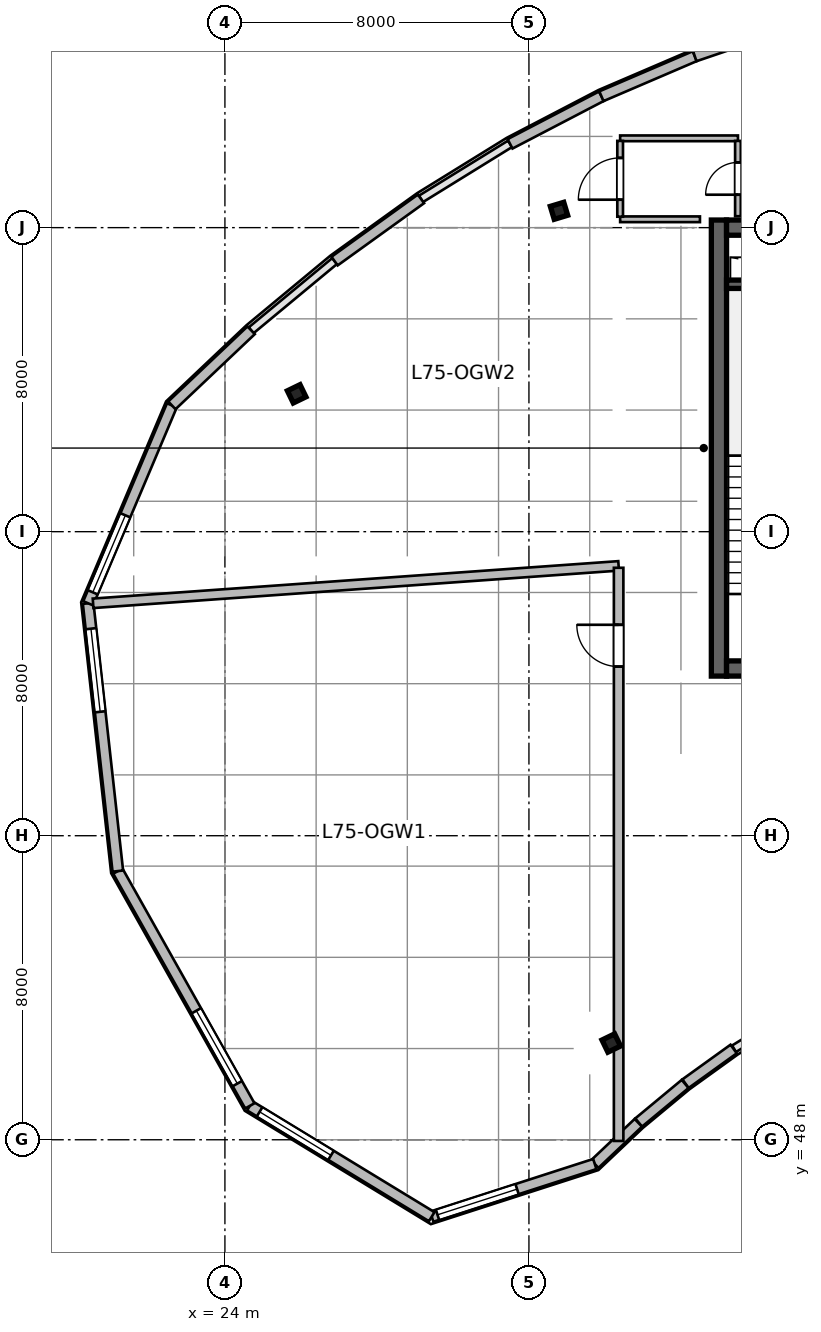
"""IFC4 building model, lengths in metres.
Left out: names, types, materials, properties, quantities, classifications, styles, units other than length and angle.
Written with IfcOpenShell. Run it as: python <this file> out.ifc"""

import sys

from ifc_helpers import new_model, si_unit, direction, frame, frame_2d, origin, origin_2d, place, context, subcontext, project, spatial, rectangle, i_section, extrude, source, transform, mapped, element, fill, save


model = new_model("IFC4")
c1 = context("Model", 3, precision=1e-05, world=origin(), true_north=direction((0.0, 1.0)))
c2 = subcontext(c1, "Body", "Model", "MODEL_VIEW")
j1 = project(units=[si_unit("LENGTHUNIT", "METRE"), si_unit("PLANEANGLEUNIT", "RADIAN")], contexts=[c1])
p1 = place(None, origin())
s1 = spatial("IfcSite", under=j1, at=p1, CompositionType="ELEMENT")
p2 = place(p1, origin())
s2 = spatial("IfcBuilding", under=s1, at=p2, CompositionType="ELEMENT")
p3 = place(p2, frame((0.0, 0.0, 307.8)))
s3 = spatial("IfcBuildingStorey", under=s2, at=p3, CompositionType="ELEMENT", Elevation=307.8)
m1 = source(origin(), c2, "Body", "SweptSolid", [
    extrude(rectangle(XDim=12.0, YDim=0.4, at=frame_2d((6.0, 0.0))), origin(), (0.0, 0.0, 1.0), 4.8),
])
p4 = place(p3, frame((37.0, 60.2, 0.0), z_axis=(0.0, 0.0, 1.0), x_axis=(0.0, 1.0, 0.0)))
e1 = element("IfcWall", 1, at=p4, inside=s3, PredefinedType="SHEAR", context=c2, shape_type="MappedRepresentation", body=[
    mapped(m1, transform((0.0, 0.0, 0.0), scale=1.0)),
])
m2 = source(origin(), c2, "Body", "SweptSolid", [
    extrude(rectangle(XDim=21.6, YDim=0.4, at=frame_2d((10.8, 0.0))), origin(), (0.0, 0.0, 1.0), 4.8),
])
p5 = place(p3, frame((37.2, 60.4, 0.0), z_axis=(0.0, 0.0, 1.0), x_axis=(1.0, 0.0, 0.0)))
e2 = element("IfcWall", 2, at=p5, inside=s3, PredefinedType="SHEAR", context=c2, shape_type="MappedRepresentation", body=[
    mapped(m2, transform((0.0, 0.0, 0.0), scale=1.0)),
])
p6 = place(p5, frame((1.1, 0.0, 0.0)))
e3 = element("IfcOpeningElement", 3, at=p6, cuts=e2, PredefinedType="OPENING", context=c2, shape_type="SweptSolid", body=[
    extrude(rectangle(XDim=1.15, YDim=2.15, at=frame_2d((0.575, 1.075))), frame((0.0, 0.21, 0.0), z_axis=(0.0, -1.0, 0.0), x_axis=(1.0, 0.0, 0.0)), (0.0, 0.0, 1.0), 0.42),
])
p7 = place(p5, frame((19.5, 0.0, 0.0)))
e4 = element("IfcOpeningElement", 4, at=p7, cuts=e2, PredefinedType="OPENING", context=c2, shape_type="SweptSolid", body=[
    extrude(rectangle(XDim=0.9, YDim=2.1, at=frame_2d((0.45, 1.05))), frame((0.0, 0.21, 0.0), z_axis=(0.0, -1.0, 0.0), x_axis=(1.0, 0.0, 0.0)), (0.0, 0.0, 1.0), 0.42),
])
p8 = place(p5, frame((12.02, 0.0, 0.0)))
e5 = element("IfcOpeningElement", 5, at=p8, cuts=e2, PredefinedType="OPENING", context=c2, shape_type="SweptSolid", body=[
    extrude(rectangle(XDim=1.6, YDim=2.15, at=frame_2d((0.8, 1.075))), frame((0.0, 0.21, 0.0), z_axis=(0.0, -1.0, 0.0), x_axis=(1.0, 0.0, 0.0)), (0.0, 0.0, 1.0), 0.42),
])
p9 = place(p3, frame((37.2, 72.0, 0.0), z_axis=(0.0, 0.0, 1.0), x_axis=(1.0, 0.0, 0.0)))
e6 = element("IfcWall", 6, at=p9, inside=s3, PredefinedType="SHEAR", context=c2, shape_type="MappedRepresentation", body=[
    mapped(m2, transform((0.0, 0.0, 0.0), scale=1.0)),
])
p10 = place(p9, frame((1.2, 0.0, 0.0)))
e7 = element("IfcOpeningElement", 7, at=p10, cuts=e6, PredefinedType="OPENING", context=c2, shape_type="SweptSolid", body=[
    extrude(rectangle(XDim=0.9, YDim=2.1, at=frame_2d((0.45, 1.05))), frame((0.0, 0.21, 0.0), z_axis=(0.0, -1.0, 0.0), x_axis=(1.0, 0.0, 0.0)), (0.0, 0.0, 1.0), 0.42),
])
p11 = place(p9, frame((14.7, 0.0, 0.0)))
e8 = element("IfcOpeningElement", 8, at=p11, cuts=e6, PredefinedType="OPENING", context=c2, shape_type="SweptSolid", body=[
    extrude(rectangle(XDim=1.2, YDim=2.15, at=frame_2d((0.6, 1.075))), frame((0.0, 0.21, 0.0), z_axis=(0.0, -1.0, 0.0), x_axis=(1.0, 0.0, 0.0)), (0.0, 0.0, 1.0), 0.42),
])
p12 = place(p9, frame((4.15, 0.0, 0.0)))
e9 = element("IfcOpeningElement", 9, at=p12, cuts=e6, PredefinedType="OPENING", context=c2, shape_type="SweptSolid", body=[
    extrude(rectangle(XDim=1.3, YDim=2.15, at=frame_2d((0.65, 1.075))), frame((0.0, 0.21, 0.0), z_axis=(0.0, -1.0, 0.0), x_axis=(1.0, 0.0, 0.0)), (0.0, 0.0, 1.0), 0.42),
])
p13 = place(p9, frame((6.76, 0.0, 0.0)))
e10 = element("IfcOpeningElement", 10, at=p13, cuts=e6, PredefinedType="OPENING", context=c2, shape_type="SweptSolid", body=[
    extrude(rectangle(XDim=0.85, YDim=2.1, at=frame_2d((0.425, 1.05))), frame((0.0, 0.21, 0.0), z_axis=(0.0, -1.0, 0.0), x_axis=(1.0, 0.0, 0.0)), (0.0, 0.0, 1.0), 0.42),
])
p14 = place(p9, frame((8.76, 0.0, 0.0)))
e11 = element("IfcOpeningElement", 11, at=p14, cuts=e6, PredefinedType="OPENING", context=c2, shape_type="SweptSolid", body=[
    extrude(rectangle(XDim=0.85, YDim=2.1, at=frame_2d((0.425, 1.05))), frame((0.0, 0.21, 0.0), z_axis=(0.0, -1.0, 0.0), x_axis=(1.0, 0.0, 0.0)), (0.0, 0.0, 1.0), 0.42),
])
p15 = place(p9, frame((10.725, 0.0, 0.0)))
e12 = element("IfcOpeningElement", 12, at=p15, cuts=e6, PredefinedType="OPENING", context=c2, shape_type="SweptSolid", body=[
    extrude(rectangle(XDim=0.85, YDim=2.1, at=frame_2d((0.425, 1.05))), frame((0.0, 0.21, 0.0), z_axis=(0.0, -1.0, 0.0), x_axis=(1.0, 0.0, 0.0)), (0.0, 0.0, 1.0), 0.42),
])
m3 = source(origin(), c2, "Body", "SweptSolid", [
    extrude(rectangle(XDim=3.27, YDim=0.22, at=frame_2d((1.635, 0.0))), origin(), (0.0, 0.0, 1.0), 4.8),
])
p16 = place(p3, frame((37.2, 70.51, 0.0), z_axis=(0.0, 0.0, 1.0), x_axis=(1.0, 0.0, 0.0)))
e13 = element("IfcWall", 13, at=p16, inside=s3, PredefinedType="SHEAR", context=c2, shape_type="MappedRepresentation", body=[
    mapped(m3, transform((0.0, 0.0, 0.0), scale=1.0)),
])
m4 = source(origin(), c2, "Body", "SweptSolid", [
    extrude(i_section(OverallWidth=0.369, OverallDepth=0.356, WebThickness=0.011, FlangeThickness=0.018, at=origin_2d()), origin(), (0.0, 0.0, 1.0), 4.8),
])
for number, where, z_axis, x_axis in (
    (14, (34.166, 50.545, 0.0), (0.0, 0.0, 1.0), (-0.436, 0.9, 0.0)),
    (15, (25.888, 67.627, 0.0), (0.0, 0.0, 1.0), (-0.436, 0.9, 0.0)),
    (16, (32.791, 72.442, 0.0), (0.0, 0.0, 1.0), (-0.289, 0.957, 0.0)),
):
    element("IfcColumn", number, at=place(p3, frame(where, z_axis=z_axis, x_axis=x_axis)), inside=s3, PredefinedType="COLUMN", context=c2, shape_type="MappedRepresentation", body=[
        mapped(m4, transform((0.0, 0.0, 0.0), scale=1.0)),
    ])
m5 = source(origin(), c2, "Body", "SweptSolid", [
    extrude(rectangle(XDim=1.561, YDim=0.28, at=frame_2d((0.781, 0.0))), origin(), (0.0, 0.0, 1.0), 4.5),
])
p17 = place(p3, frame((37.387, 50.387, 0.0), z_axis=(0.0, 0.0, 1.0), x_axis=(-0.81154027425, -0.584296485758, 0.0)))
e17 = element("IfcWall", 17, at=p17, inside=s3, PredefinedType="SOLIDWALL", context=c2, shape_type="MappedRepresentation", body=[
    mapped(m5, transform((0.0, 0.0, 0.0), scale=1.0)),
])
m6 = source(origin(), c2, "Body", "SweptSolid", [
    extrude(rectangle(XDim=1.589, YDim=0.28, at=frame_2d((0.794, 0.0))), origin(), (0.0, 0.0, 1.0), 4.5),
])
p18 = place(p3, frame((36.11, 49.468, 0.0), z_axis=(0.0, 0.0, 1.0), x_axis=(-0.769805836273, -0.63827813251, 0.0)))
e18 = element("IfcWall", 18, at=p18, inside=s3, PredefinedType="SOLIDWALL", context=c2, shape_type="MappedRepresentation", body=[
    mapped(m6, transform((0.0, 0.0, 0.0), scale=1.0)),
])
m7 = source(origin(), c2, "Body", "SweptSolid", [
    extrude(rectangle(XDim=1.577, YDim=0.28, at=frame_2d((0.789, 0.0))), origin(), (0.0, 0.0, 1.0), 4.5),
])
p19 = place(p3, frame((34.878, 48.446, 0.0), z_axis=(0.0, 0.0, 1.0), x_axis=(-0.726119464467, -0.687568558998, 0.0)))
e19 = element("IfcWall", 19, at=p19, inside=s3, PredefinedType="SOLIDWALL", context=c2, shape_type="MappedRepresentation", body=[
    mapped(m7, transform((0.0, 0.0, 0.0), scale=1.0)),
])
m8 = source(origin(), c2, "Body", "SweptSolid", [
    extrude(rectangle(XDim=4.509, YDim=0.28, at=frame_2d((2.255, 0.0))), origin(), (0.0, 0.0, 1.0), 4.5),
])
p20 = place(p3, frame((33.733, 47.361, 0.0), z_axis=(0.0, 0.0, 1.0), x_axis=(-0.95162949292, -0.307247958828, 0.0)))
e20 = element("IfcWall", 20, at=p20, inside=s3, PredefinedType="SOLIDWALL", context=c2, shape_type="MappedRepresentation", body=[
    mapped(m8, transform((0.0, 0.0, 0.0), scale=1.0)),
])
p21 = place(p20, frame((2.149, 0.0, 0.95)))
e21 = element("IfcOpeningElement", 21, at=p21, cuts=e20, PredefinedType="OPENING", context=c2, shape_type="SweptSolid", body=[
    extrude(rectangle(XDim=2.2, YDim=2.1, at=frame_2d((1.1, 1.05))), frame((0.0, 0.15, 0.0), z_axis=(0.0, -1.0, 0.0), x_axis=(1.0, 0.0, 0.0)), (0.0, 0.0, 1.0), 0.3),
])
m9 = source(origin(), c2, "Body", "SweptSolid", [
    extrude(rectangle(XDim=5.604, YDim=0.28, at=frame_2d((2.802, 0.0))), origin(), (0.0, 0.0, 1.0), 4.5),
])
p22 = place(p3, frame((29.442, 45.976, 0.0), z_axis=(0.0, 0.0, 1.0), x_axis=(-0.854002492971, 0.520268913158, 0.0)))
e22 = element("IfcWall", 22, at=p22, inside=s3, PredefinedType="SOLIDWALL", context=c2, shape_type="MappedRepresentation", body=[
    mapped(m9, transform((0.0, 0.0, 0.0), scale=1.0)),
])
p23 = place(p22, frame((3.103, 0.0, 0.95)))
e23 = element("IfcOpeningElement", 23, at=p23, cuts=e22, PredefinedType="OPENING", context=c2, shape_type="SweptSolid", body=[
    extrude(rectangle(XDim=2.2, YDim=2.1, at=frame_2d((1.1, 1.05))), frame((0.0, 0.15, 0.0), z_axis=(0.0, -1.0, 0.0), x_axis=(1.0, 0.0, 0.0)), (0.0, 0.0, 1.0), 0.3),
])
m10 = source(origin(), c2, "Body", "SweptSolid", [
    extrude(rectangle(XDim=7.087, YDim=0.28, at=frame_2d((3.543, 0.0))), origin(), (0.0, 0.0, 1.0), 4.5),
])
p24 = place(p3, frame((24.656, 48.892, 0.0), z_axis=(0.0, 0.0, 1.0), x_axis=(-0.490158199368, 0.871633489256, 0.0)))
e24 = element("IfcWall", 24, at=p24, inside=s3, PredefinedType="SOLIDWALL", context=c2, shape_type="MappedRepresentation", body=[
    mapped(m10, transform((0.0, 0.0, 0.0), scale=1.0)),
])
p25 = place(p24, frame((0.672, 0.0, 0.95)))
e25 = element("IfcOpeningElement", 25, at=p25, cuts=e24, PredefinedType="OPENING", context=c2, shape_type="SweptSolid", body=[
    extrude(rectangle(XDim=2.2, YDim=2.1, at=frame_2d((1.1, 1.05))), frame((0.0, 0.15, 0.0), z_axis=(0.0, -1.0, 0.0), x_axis=(1.0, 0.0, 0.0)), (0.0, 0.0, 1.0), 0.3),
])
m11 = source(origin(), c2, "Body", "SweptSolid", [
    extrude(rectangle(XDim=7.09, YDim=0.28, at=frame_2d((3.545, 0.0))), origin(), (0.0, 0.0, 1.0), 4.5),
])
p26 = place(p3, frame((21.182, 55.069, 0.0), z_axis=(0.0, 0.0, 1.0), x_axis=(-0.110159396922, 0.993913933532, 0.0)))
e26 = element("IfcWall", 26, at=p26, inside=s3, PredefinedType="SOLIDWALL", context=c2, shape_type="MappedRepresentation", body=[
    mapped(m11, transform((0.0, 0.0, 0.0), scale=1.0)),
])
p27 = place(p26, frame((4.217, 0.0, 0.95)))
e27 = element("IfcOpeningElement", 27, at=p27, cuts=e26, PredefinedType="OPENING", context=c2, shape_type="SweptSolid", body=[
    extrude(rectangle(XDim=2.2, YDim=2.1, at=frame_2d((1.1, 1.05))), frame((0.0, 0.15, 0.0), z_axis=(0.0, -1.0, 0.0), x_axis=(1.0, 0.0, 0.0)), (0.0, 0.0, 1.0), 0.3),
])
m12 = source(origin(), c2, "Body", "SweptSolid", [
    extrude(rectangle(XDim=5.655, YDim=0.28, at=frame_2d((2.828, 0.0))), origin(), (0.0, 0.0, 1.0), 4.5),
])
p28 = place(p3, frame((20.401, 62.116, 0.0), z_axis=(0.0, 0.0, 1.0), x_axis=(0.389585063528, 0.920990487614, 0.0)))
e28 = element("IfcWall", 28, at=p28, inside=s3, PredefinedType="SOLIDWALL", context=c2, shape_type="MappedRepresentation", body=[
    mapped(m12, transform((0.0, 0.0, 0.0), scale=1.0)),
])
p29 = place(p28, frame((0.314, 0.0, 0.95)))
e29 = element("IfcOpeningElement", 29, at=p29, cuts=e28, PredefinedType="OPENING", context=c2, shape_type="SweptSolid", body=[
    extrude(rectangle(XDim=2.2, YDim=2.1, at=frame_2d((1.1, 1.05))), frame((0.0, 0.15, 0.0), z_axis=(0.0, -1.0, 0.0), x_axis=(1.0, 0.0, 0.0)), (0.0, 0.0, 1.0), 0.3),
])
m13 = source(origin(), c2, "Body", "SweptSolid", [
    extrude(rectangle(XDim=2.873, YDim=0.28, at=frame_2d((1.436, 0.0))), origin(), (0.0, 0.0, 1.0), 4.5),
])
p30 = place(p3, frame((22.604, 67.324, 0.0), z_axis=(0.0, 0.0, 1.0), x_axis=(0.72609560544, 0.687593754888, 0.0)))
e30 = element("IfcWall", 30, at=p30, inside=s3, PredefinedType="SOLIDWALL", context=c2, shape_type="MappedRepresentation", body=[
    mapped(m13, transform((0.0, 0.0, 0.0), scale=1.0)),
])
m14 = source(origin(), c2, "Body", "SweptSolid", [
    extrude(rectangle(XDim=2.802, YDim=0.28, at=frame_2d((1.401, 0.0))), origin(), (0.0, 0.0, 1.0), 4.5),
])
p31 = place(p3, frame((26.885, 71.12, 0.0), z_axis=(0.0, 0.0, 1.0), x_axis=(0.811507896482, 0.584341453217, 0.0)))
e31 = element("IfcWall", 31, at=p31, inside=s3, PredefinedType="SOLIDWALL", context=c2, shape_type="MappedRepresentation", body=[
    mapped(m14, transform((0.0, 0.0, 0.0), scale=1.0)),
])
m15 = source(origin(), c2, "Body", "SweptSolid", [
    extrude(rectangle(XDim=2.711, YDim=0.28, at=frame_2d((1.356, 0.0))), origin(), (0.0, 0.0, 1.0), 4.5),
])
p32 = place(p3, frame((31.502, 74.205, 0.0), z_axis=(0.0, 0.0, 1.0), x_axis=(0.886828760751, 0.462098202881, 0.0)))
e32 = element("IfcWall", 32, at=p32, inside=s3, PredefinedType="SOLIDWALL", context=c2, shape_type="MappedRepresentation", body=[
    mapped(m15, transform((0.0, 0.0, 0.0), scale=1.0)),
])
m16 = source(origin(), c2, "Body", "SweptSolid", [
    extrude(rectangle(XDim=2.673, YDim=0.28, at=frame_2d((1.337, 0.0))), origin(), (0.0, 0.0, 1.0), 4.5),
])
p33 = place(p3, frame((33.907, 75.458, 0.0), z_axis=(0.0, 0.0, 1.0), x_axis=(0.919036345912, 0.394172798266, 0.0)))
e33 = element("IfcWall", 33, at=p33, inside=s3, PredefinedType="SOLIDWALL", context=c2, shape_type="MappedRepresentation", body=[
    mapped(m16, transform((0.0, 0.0, 0.0), scale=1.0)),
])
m17 = source(origin(), c2, "Body", "SweptSolid", [
    extrude(rectangle(XDim=2.64, YDim=0.28, at=frame_2d((1.32, 0.0))), origin(), (0.0, 0.0, 1.0), 4.5),
])
p34 = place(p3, frame((36.364, 76.511, 0.0), z_axis=(0.0, 0.0, 1.0), x_axis=(0.946685911962, 0.322158011064, 0.0)))
e34 = element("IfcWall", 34, at=p34, inside=s3, PredefinedType="SOLIDWALL", context=c2, shape_type="MappedRepresentation", body=[
    mapped(m17, transform((0.0, 0.0, 0.0), scale=1.0)),
])
m18 = source(origin(), c2, "Body", "SweptSolid", [
    extrude(rectangle(XDim=2.1, YDim=0.15, at=frame_2d((1.05, 0.0))), origin(), (0.0, 0.0, 1.0), 4.5),
])
p35 = place(p3, frame((34.4, 72.22, 0.0), z_axis=(0.0, 0.0, 1.0), x_axis=(1.0, 0.0, 0.0)))
e35 = element("IfcWall", 35, at=p35, inside=s3, PredefinedType="PARTITIONING", context=c2, shape_type="MappedRepresentation", body=[
    mapped(m18, transform((0.0, 0.0, 0.0), scale=1.0)),
])
m19 = source(origin(), c2, "Body", "SweptSolid", [
    extrude(rectangle(XDim=3.1, YDim=0.15, at=frame_2d((1.55, 0.0))), origin(), (0.0, 0.0, 1.0), 3.931),
])
p36 = place(p3, frame((34.4, 74.35, 0.0), z_axis=(0.0, 0.0, 1.0), x_axis=(1.0, 0.0, 0.0)))
e36 = element("IfcWall", 36, at=p36, inside=s3, PredefinedType="PARTITIONING", context=c2, shape_type="MappedRepresentation", body=[
    mapped(m19, transform((0.0, 0.0, 0.0), scale=1.0)),
])
m20 = source(origin(), c2, "Body", "SweptSolid", [
    extrude(rectangle(XDim=1.995, YDim=0.15, at=frame_2d((0.998, 0.0))), origin(), (0.0, 0.0, 1.0), 4.5),
])
p37 = place(p3, frame((34.4, 72.288, 0.0), z_axis=(0.0, 0.0, 1.0), x_axis=(0.0, 1.0, 0.0)))
e37 = element("IfcWall", 37, at=p37, inside=s3, PredefinedType="PARTITIONING", context=c2, shape_type="MappedRepresentation", body=[
    mapped(m20, transform((0.0, 0.0, 0.0), scale=1.0)),
])
p38 = place(p37, frame((0.448, 0.0, 0.0)))
e38 = element("IfcOpeningElement", 38, at=p38, cuts=e37, PredefinedType="OPENING", context=c2, shape_type="SweptSolid", body=[
    extrude(rectangle(XDim=1.1, YDim=2.15, at=frame_2d((0.55, 1.075))), frame((0.0, 0.085, 0.0), z_axis=(0.0, -1.0, 0.0), x_axis=(1.0, 0.0, 0.0)), (0.0, 0.0, 1.0), 0.17),
])
m21 = source(origin(), c2, "Body", "SweptSolid", [
    extrude(rectangle(XDim=1.982, YDim=0.15, at=frame_2d((0.991, 0.0))), origin(), (0.0, 0.0, 1.0), 4.5),
])
p39 = place(p3, frame((37.5, 72.3, 0.0), z_axis=(0.0, 0.0, 1.0), x_axis=(0.0, 1.0, 0.0)))
e39 = element("IfcWall", 39, at=p39, inside=s3, PredefinedType="PARTITIONING", context=c2, shape_type="MappedRepresentation", body=[
    mapped(m21, transform((0.0, 0.0, 0.0), scale=1.0)),
])
p40 = place(p39, frame((0.566, 0.0, 0.0)))
e40 = element("IfcOpeningElement", 40, at=p40, cuts=e39, PredefinedType="OPENING", context=c2, shape_type="SweptSolid", body=[
    extrude(rectangle(XDim=0.85, YDim=2.1, at=frame_2d((0.425, 1.05))), frame((0.0, 0.085, 0.0), z_axis=(0.0, -1.0, 0.0), x_axis=(1.0, 0.0, 0.0)), (0.0, 0.0, 1.0), 0.17),
])
m22 = source(origin(), c2, "Body", "SweptSolid", [
    extrude(rectangle(XDim=13.864, YDim=0.25, at=frame_2d((6.932, 0.0))), origin(), (0.0, 0.0, 1.0), 4.5),
])
p41 = place(p3, frame((20.531, 62.115, 0.0), z_axis=(0.0, 0.0, 1.0), x_axis=(0.997472447014, 0.071054327443, 0.0)))
e41 = element("IfcWall", 41, at=p41, inside=s3, PredefinedType="PARTITIONING", context=c2, shape_type="MappedRepresentation", body=[
    mapped(m22, transform((0.0, 0.0, 0.0), scale=1.0)),
])
m23 = source(origin(), c2, "Body", "SweptSolid", [
    extrude(rectangle(XDim=15.081, YDim=0.25, at=frame_2d((7.541, 0.0))), origin(), (0.0, 0.0, 1.0), 4.5),
])
p42 = place(p3, frame((34.36, 47.969, 0.0), z_axis=(0.0, 0.0, 1.0), x_axis=(0.0, 1.0, 0.0)))
e42 = element("IfcWall", 42, at=p42, inside=s3, PredefinedType="PARTITIONING", context=c2, shape_type="MappedRepresentation", body=[
    mapped(m23, transform((0.0, 0.0, 0.0), scale=1.0)),
])
p43 = place(p42, frame((12.481, 0.0, 0.0)))
e43 = element("IfcOpeningElement", 43, at=p43, cuts=e42, PredefinedType="OPENING", context=c2, shape_type="SweptSolid", body=[
    extrude(rectangle(XDim=1.1, YDim=2.15, at=frame_2d((0.55, 1.075))), frame((0.0, 0.135, 0.0), z_axis=(0.0, -1.0, 0.0), x_axis=(1.0, 0.0, 0.0)), (0.0, 0.0, 1.0), 0.27),
])
m24 = source(origin(), c2, "Body", "SweptSolid", [
    extrude(rectangle(XDim=2.2, YDim=2.1, at=frame_2d((1.1, 1.05))), frame((0.0, 0.03, 0.0), z_axis=(0.0, -1.0, 0.0), x_axis=(1.0, 0.0, 0.0)), (0.0, 0.0, 1.0), 0.06),
])
p44 = place(p21, origin())
e44 = element("IfcWindow", 44, at=p44, inside=s3, PartitioningType="TRIPLE_PANEL_VERTICAL", PredefinedType="WINDOW", context=c2, shape_type="MappedRepresentation", body=[
    mapped(m24, transform((0.0, 0.0, 0.0), scale=1.0)),
])
fill(e21, e44)
p45 = place(p23, origin())
e45 = element("IfcWindow", 45, at=p45, inside=s3, PartitioningType="TRIPLE_PANEL_VERTICAL", PredefinedType="WINDOW", context=c2, shape_type="MappedRepresentation", body=[
    mapped(m24, transform((0.0, 0.0, 0.0), scale=1.0)),
])
fill(e23, e45)
p46 = place(p25, origin())
e46 = element("IfcWindow", 46, at=p46, inside=s3, PartitioningType="TRIPLE_PANEL_VERTICAL", PredefinedType="WINDOW", context=c2, shape_type="MappedRepresentation", body=[
    mapped(m24, transform((0.0, 0.0, 0.0), scale=1.0)),
])
fill(e25, e46)
p47 = place(p27, origin())
e47 = element("IfcWindow", 47, at=p47, inside=s3, PartitioningType="TRIPLE_PANEL_VERTICAL", PredefinedType="WINDOW", context=c2, shape_type="MappedRepresentation", body=[
    mapped(m24, transform((0.0, 0.0, 0.0), scale=1.0)),
])
fill(e27, e47)
p48 = place(p29, origin())
e48 = element("IfcWindow", 48, at=p48, inside=s3, PartitioningType="TRIPLE_PANEL_VERTICAL", PredefinedType="WINDOW", context=c2, shape_type="MappedRepresentation", body=[
    mapped(m24, transform((0.0, 0.0, 0.0), scale=1.0)),
])
fill(e29, e48)
m25 = source(origin(), c2, "Body", "SweptSolid", [
    extrude(rectangle(XDim=0.85, YDim=2.1, at=frame_2d((0.425, 1.05))), frame((0.0, 0.025, 0.0), z_axis=(0.0, -1.0, 0.0), x_axis=(1.0, 0.0, 0.0)), (0.0, 0.0, 1.0), 0.05),
])
p49 = place(p40, origin())
e49 = element("IfcDoor", 49, at=p49, inside=s3, OperationType="SINGLE_SWING_LEFT", PredefinedType="DOOR", context=c2, shape_type="MappedRepresentation", body=[
    mapped(m25, transform((0.0, 0.0, 0.0), scale=1.0)),
])
fill(e40, e49)
m26 = source(origin(), c2, "Body", "SweptSolid", [
    extrude(rectangle(XDim=1.1, YDim=2.15, at=frame_2d((0.55, 1.075))), frame((0.0, 0.025, 0.0), z_axis=(0.0, -1.0, 0.0), x_axis=(1.0, 0.0, 0.0)), (0.0, 0.0, 1.0), 0.05),
])
p50 = place(p43, origin())
e50 = element("IfcDoor", 50, at=p50, inside=s3, OperationType="SINGLE_SWING_RIGHT", PredefinedType="DOOR", context=c2, shape_type="MappedRepresentation", body=[
    mapped(m26, transform((0.0, 0.0, 0.0), scale=1.0)),
])
fill(e43, e50)
p51 = place(p38, origin())
e51 = element("IfcDoor", 51, at=p51, inside=s3, OperationType="SINGLE_SWING_LEFT", PredefinedType="DOOR", context=c2, shape_type="MappedRepresentation", body=[
    mapped(m26, transform((0.0, 0.0, 0.0), scale=1.0)),
])
fill(e38, e51)
save(model, sys.argv[1])
